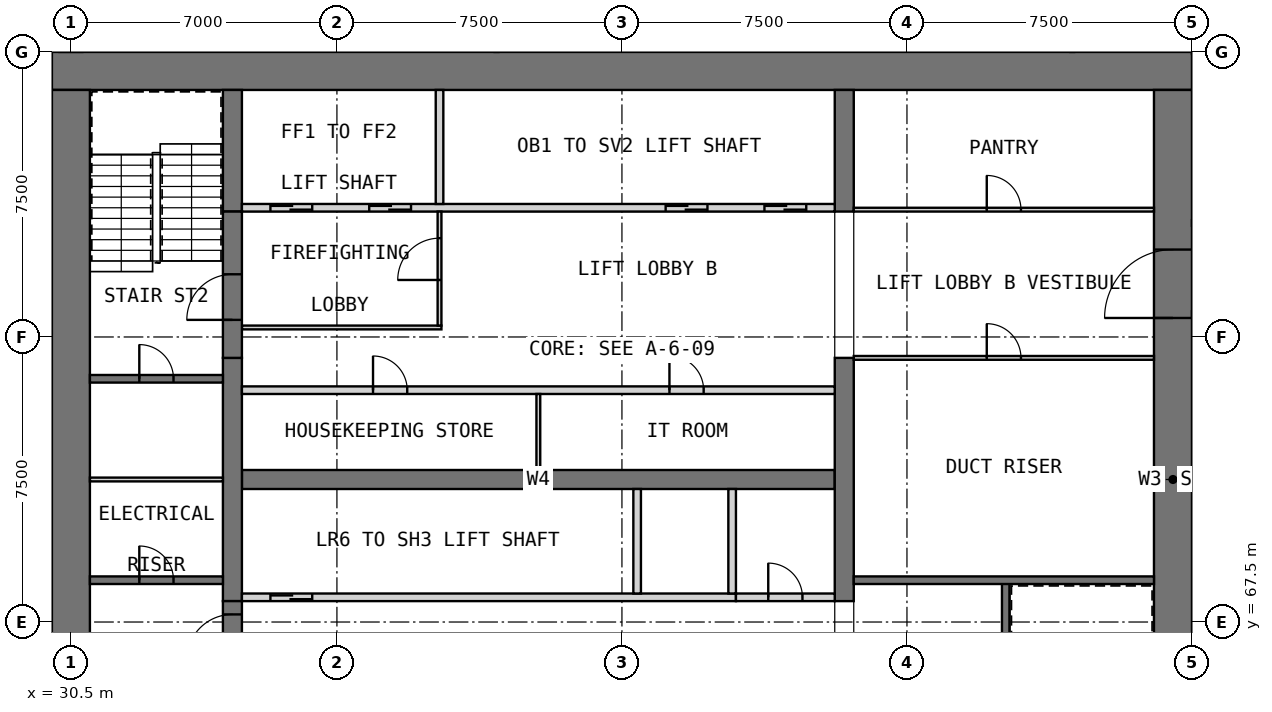
"""IFC4 building model, lengths in metres.
Left out: names, types, materials, properties, quantities, classifications, styles, units other than length and angle.
Written with IfcOpenShell. Run it as: python <this file> out.ifc"""

import sys

from ifc_helpers import new_model, si_unit, direction, frame, frame_2d, origin, place, context, subcontext, project, spatial, rectangle, extrude, element, fill, save


model = new_model("IFC4")
c1 = context("Model", 3, precision=1e-05, world=origin(), true_north=direction((0.0, 1.0)))
c2 = subcontext(c1, "Body", "Model", "MODEL_VIEW")
j1 = project(units=[si_unit("LENGTHUNIT", "METRE"), si_unit("PLANEANGLEUNIT", "RADIAN")], contexts=[c1])
p1 = place(None, origin())
s1 = spatial("IfcSite", under=j1, at=p1, CompositionType="ELEMENT")
p2 = place(p1, origin())
s2 = spatial("IfcBuilding", under=s1, at=p2, CompositionType="ELEMENT")
p3 = place(p2, frame((0.0, 0.0, 79.1)))
s3 = spatial("IfcBuildingStorey", under=s2, at=p3, CompositionType="ELEMENT", Elevation=79.1)
p4 = place(p3, frame((30.0, 82.0, 0.0), z_axis=(0.0, 0.0, 1.0), x_axis=(1.0, 0.0, 0.0)))
e1 = element("IfcWall", 1, at=p4, inside=s3, PredefinedType="SHEAR", context=c2, shape_type="SweptSolid", body=[
    extrude(rectangle(XDim=30.0, YDim=1.0, at=frame_2d((15.0, 0.0))), origin(), (0.0, 0.0, 1.0), 3.6),
])
p5 = place(p3, frame((30.5, 61.0, 0.0), z_axis=(0.0, 0.0, 1.0), x_axis=(0.0, 1.0, 0.0)))
e2 = element("IfcWall", 2, at=p5, inside=s3, PredefinedType="SHEAR", context=c2, shape_type="SweptSolid", body=[
    extrude(rectangle(XDim=20.5, YDim=1.0, at=frame_2d((10.25, 0.0))), origin(), (0.0, 0.0, 1.0), 3.6),
])
p6 = place(p3, frame((59.5, 61.0, 0.0), z_axis=(0.0, 0.0, 1.0), x_axis=(0.0, 1.0, 0.0)))
e3 = element("IfcWall", 3, at=p6, inside=s3, PredefinedType="SHEAR", context=c2, shape_type="SweptSolid", body=[
    extrude(rectangle(XDim=20.5, YDim=1.0, at=frame_2d((10.25, 0.0))), origin(), (0.0, 0.0, 1.0), 3.6),
])
p7 = place(p6, frame((14.5, 0.0, 0.0)))
e4 = element("IfcOpeningElement", 4, at=p7, cuts=e3, PredefinedType="OPENING", context=c2, shape_type="SweptSolid", body=[
    extrude(rectangle(XDim=1.8, YDim=2.1, at=frame_2d((0.9, 1.05))), frame((0.0, 0.51, 0.0), z_axis=(0.0, -1.0, 0.0), x_axis=(1.0, 0.0, 0.0)), (0.0, 0.0, 1.0), 1.02),
])
p8 = place(p3, frame((35.0, 71.25, 0.0), z_axis=(0.0, 0.0, 1.0), x_axis=(1.0, 0.0, 0.0)))
e5 = element("IfcWall", 5, at=p8, inside=s3, PredefinedType="SHEAR", context=c2, shape_type="SweptSolid", body=[
    extrude(rectangle(XDim=15.6, YDim=0.5, at=frame_2d((7.8, 0.0))), origin(), (0.0, 0.0, 1.0), 3.6),
])
p9 = place(p3, frame((34.75, 68.05, 0.0), z_axis=(0.0, 0.0, 1.0), x_axis=(0.0, 1.0, 0.0)))
e6 = element("IfcWall", 6, at=p9, inside=s3, PredefinedType="SHEAR", context=c2, shape_type="SweptSolid", body=[
    extrude(rectangle(XDim=6.4, YDim=0.5, at=frame_2d((3.2, 0.0))), origin(), (0.0, 0.0, 1.0), 3.6),
])
p10 = place(p3, frame((34.75, 78.3, 0.0), z_axis=(0.0, 0.0, 1.0), x_axis=(0.0, 1.0, 0.0)))
e7 = element("IfcWall", 7, at=p10, inside=s3, PredefinedType="SHEAR", context=c2, shape_type="SweptSolid", body=[
    extrude(rectangle(XDim=3.2, YDim=0.5, at=frame_2d((1.6, 0.0))), origin(), (0.0, 0.0, 1.0), 3.6),
])
p11 = place(p3, frame((50.85, 68.05, 0.0), z_axis=(0.0, 0.0, 1.0), x_axis=(0.0, 1.0, 0.0)))
e8 = element("IfcWall", 8, at=p11, inside=s3, PredefinedType="SHEAR", context=c2, shape_type="SweptSolid", body=[
    extrude(rectangle(XDim=6.4, YDim=0.5, at=frame_2d((3.2, 0.0))), origin(), (0.0, 0.0, 1.0), 3.6),
])
p12 = place(p3, frame((50.85, 78.3, 0.0), z_axis=(0.0, 0.0, 1.0), x_axis=(0.0, 1.0, 0.0)))
e9 = element("IfcWall", 9, at=p12, inside=s3, PredefinedType="SHEAR", context=c2, shape_type="SweptSolid", body=[
    extrude(rectangle(XDim=3.2, YDim=0.5, at=frame_2d((1.6, 0.0))), origin(), (0.0, 0.0, 1.0), 3.6),
])
p13 = place(p3, frame((35.0, 68.15, 0.0), z_axis=(0.0, 0.0, 1.0), x_axis=(1.0, 0.0, 0.0)))
e10 = element("IfcWall", 10, at=p13, inside=s3, PredefinedType="SOLIDWALL", context=c2, shape_type="SweptSolid", body=[
    extrude(rectangle(XDim=13.0, YDim=0.2, at=frame_2d((6.5, 0.0))), origin(), (0.0, 0.0, 1.0), 3.6),
])
p14 = place(p13, frame((0.75, 0.0, 0.0)))
e11 = element("IfcOpeningElement", 11, at=p14, cuts=e10, PredefinedType="OPENING", context=c2, shape_type="SweptSolid", body=[
    extrude(rectangle(XDim=1.1, YDim=2.1, at=frame_2d((0.55, 1.05))), frame((0.0, 0.11, 0.0), z_axis=(0.0, -1.0, 0.0), x_axis=(1.0, 0.0, 0.0)), (0.0, 0.0, 1.0), 0.22),
])
for number, where, z_axis, x_axis in (
    (12, (45.4, 68.25, 0.0), (0.0, 0.0, 1.0), (0.0, 1.0, 0.0)),
    (13, (47.9, 68.25, 0.0), (0.0, 0.0, 1.0), (0.0, 1.0, 0.0)),
):
    element("IfcWall", number, at=place(p3, frame(where, z_axis=z_axis, x_axis=x_axis)), inside=s3, PredefinedType="SOLIDWALL", context=c2, shape_type="SweptSolid", body=[
        extrude(rectangle(XDim=2.75, YDim=0.2, at=frame_2d((1.375, 0.0))), origin(), (0.0, 0.0, 1.0), 3.6),
    ])
p15 = place(p3, frame((48.0, 68.15, 0.0), z_axis=(0.0, 0.0, 1.0), x_axis=(1.0, 0.0, 0.0)))
e14 = element("IfcWall", 14, at=p15, inside=s3, PredefinedType="PARTITIONING", context=c2, shape_type="SweptSolid", body=[
    extrude(rectangle(XDim=2.6, YDim=0.2, at=frame_2d((1.3, 0.0))), origin(), (0.0, 0.0, 1.0), 3.35),
])
p16 = place(p15, frame((0.85, 0.0, 0.0)))
e15 = element("IfcOpeningElement", 15, at=p16, cuts=e14, PredefinedType="OPENING", context=c2, shape_type="SweptSolid", body=[
    extrude(rectangle(XDim=0.9, YDim=2.1, at=frame_2d((0.45, 1.05))), frame((0.0, 0.11, 0.0), z_axis=(0.0, -1.0, 0.0), x_axis=(1.0, 0.0, 0.0)), (0.0, 0.0, 1.0), 0.22),
])
p17 = place(p3, frame((35.0, 73.6, 0.0), z_axis=(0.0, 0.0, 1.0), x_axis=(1.0, 0.0, 0.0)))
e16 = element("IfcWall", 16, at=p17, inside=s3, PredefinedType="PARTITIONING", context=c2, shape_type="SweptSolid", body=[
    extrude(rectangle(XDim=15.6, YDim=0.2, at=frame_2d((7.8, 0.0))), origin(), (0.0, 0.0, 1.0), 3.35),
])
p18 = place(p17, frame((3.45, 0.0, 0.0)))
e17 = element("IfcOpeningElement", 17, at=p18, cuts=e16, PredefinedType="OPENING", context=c2, shape_type="SweptSolid", body=[
    extrude(rectangle(XDim=0.9, YDim=2.1, at=frame_2d((0.45, 1.05))), frame((0.0, 0.11, 0.0), z_axis=(0.0, -1.0, 0.0), x_axis=(1.0, 0.0, 0.0)), (0.0, 0.0, 1.0), 0.22),
])
p19 = place(p17, frame((11.25, 0.0, 0.0)))
e18 = element("IfcOpeningElement", 18, at=p19, cuts=e16, PredefinedType="OPENING", context=c2, shape_type="SweptSolid", body=[
    extrude(rectangle(XDim=0.9, YDim=2.1, at=frame_2d((0.45, 1.05))), frame((0.0, 0.11, 0.0), z_axis=(0.0, -1.0, 0.0), x_axis=(1.0, 0.0, 0.0)), (0.0, 0.0, 1.0), 0.22),
])
p20 = place(p3, frame((42.8, 71.5, 0.0), z_axis=(0.0, 0.0, 1.0), x_axis=(0.0, 1.0, 0.0)))
e19 = element("IfcWall", 19, at=p20, inside=s3, PredefinedType="PARTITIONING", context=c2, shape_type="SweptSolid", body=[
    extrude(rectangle(XDim=2.0, YDim=0.1, at=frame_2d((1.0, 0.0))), origin(), (0.0, 0.0, 1.0), 3.35),
])
p21 = place(p3, frame((35.0, 78.4, 0.0), z_axis=(0.0, 0.0, 1.0), x_axis=(1.0, 0.0, 0.0)))
e20 = element("IfcWall", 20, at=p21, inside=s3, PredefinedType="SOLIDWALL", context=c2, shape_type="SweptSolid", body=[
    extrude(rectangle(XDim=15.6, YDim=0.2, at=frame_2d((7.8, 0.0))), origin(), (0.0, 0.0, 1.0), 3.6),
])
p22 = place(p21, frame((0.75, 0.0, 0.0)))
e21 = element("IfcOpeningElement", 21, at=p22, cuts=e20, PredefinedType="OPENING", context=c2, shape_type="SweptSolid", body=[
    extrude(rectangle(XDim=1.1, YDim=2.1, at=frame_2d((0.55, 1.05))), frame((0.0, 0.11, 0.0), z_axis=(0.0, -1.0, 0.0), x_axis=(1.0, 0.0, 0.0)), (0.0, 0.0, 1.0), 0.22),
])
p23 = place(p21, frame((3.35, 0.0, 0.0)))
e22 = element("IfcOpeningElement", 22, at=p23, cuts=e20, PredefinedType="OPENING", context=c2, shape_type="SweptSolid", body=[
    extrude(rectangle(XDim=1.1, YDim=2.1, at=frame_2d((0.55, 1.05))), frame((0.0, 0.11, 0.0), z_axis=(0.0, -1.0, 0.0), x_axis=(1.0, 0.0, 0.0)), (0.0, 0.0, 1.0), 0.22),
])
p24 = place(p21, frame((11.15, 0.0, 0.0)))
e23 = element("IfcOpeningElement", 23, at=p24, cuts=e20, PredefinedType="OPENING", context=c2, shape_type="SweptSolid", body=[
    extrude(rectangle(XDim=1.1, YDim=2.1, at=frame_2d((0.55, 1.05))), frame((0.0, 0.11, 0.0), z_axis=(0.0, -1.0, 0.0), x_axis=(1.0, 0.0, 0.0)), (0.0, 0.0, 1.0), 0.22),
])
p25 = place(p21, frame((13.75, 0.0, 0.0)))
e24 = element("IfcOpeningElement", 24, at=p25, cuts=e20, PredefinedType="OPENING", context=c2, shape_type="SweptSolid", body=[
    extrude(rectangle(XDim=1.1, YDim=2.1, at=frame_2d((0.55, 1.05))), frame((0.0, 0.11, 0.0), z_axis=(0.0, -1.0, 0.0), x_axis=(1.0, 0.0, 0.0)), (0.0, 0.0, 1.0), 0.22),
])
p26 = place(p3, frame((40.2, 78.5, 0.0), z_axis=(0.0, 0.0, 1.0), x_axis=(0.0, 1.0, 0.0)))
e25 = element("IfcWall", 25, at=p26, inside=s3, PredefinedType="SOLIDWALL", context=c2, shape_type="SweptSolid", body=[
    extrude(rectangle(XDim=3.0, YDim=0.2, at=frame_2d((1.5, 0.0))), origin(), (0.0, 0.0, 1.0), 3.6),
])
p27 = place(p3, frame((35.0, 75.25, 0.0), z_axis=(0.0, 0.0, 1.0), x_axis=(1.0, 0.0, 0.0)))
e26 = element("IfcWall", 26, at=p27, inside=s3, PredefinedType="PARTITIONING", context=c2, shape_type="SweptSolid", body=[
    extrude(rectangle(XDim=5.25, YDim=0.1, at=frame_2d((2.625, 0.0))), origin(), (0.0, 0.0, 1.0), 3.35),
])
p28 = place(p3, frame((40.2, 75.3, 0.0), z_axis=(0.0, 0.0, 1.0), x_axis=(0.0, 1.0, 0.0)))
e27 = element("IfcWall", 27, at=p28, inside=s3, PredefinedType="PARTITIONING", context=c2, shape_type="SweptSolid", body=[
    extrude(rectangle(XDim=3.0, YDim=0.1, at=frame_2d((1.5, 0.0))), origin(), (0.0, 0.0, 1.0), 3.35),
])
p29 = place(p28, frame((1.2, 0.0, 0.0)))
e28 = element("IfcOpeningElement", 28, at=p29, cuts=e27, PredefinedType="OPENING", context=c2, shape_type="SweptSolid", body=[
    extrude(rectangle(XDim=1.1, YDim=2.1, at=frame_2d((0.55, 1.05))), frame((0.0, 0.06, 0.0), z_axis=(0.0, -1.0, 0.0), x_axis=(1.0, 0.0, 0.0)), (0.0, 0.0, 1.0), 0.12),
])
p30 = place(p3, frame((34.75, 64.2, 0.0), z_axis=(0.0, 0.0, 1.0), x_axis=(0.0, 1.0, 0.0)))
e29 = element("IfcWall", 29, at=p30, inside=s3, PredefinedType="SOLIDWALL", context=c2, shape_type="SweptSolid", body=[
    extrude(rectangle(XDim=3.85, YDim=0.5, at=frame_2d((1.925, 0.0))), origin(), (0.0, 0.0, 1.0), 2.4),
])
p31 = place(p30, frame((2.3, 0.0, 0.0)))
e30 = element("IfcOpeningElement", 30, at=p31, cuts=e29, PredefinedType="OPENING", context=c2, shape_type="SweptSolid", body=[
    extrude(rectangle(XDim=1.2, YDim=2.1, at=frame_2d((0.6, 1.05))), frame((0.0, 0.26, 0.0), z_axis=(0.0, -1.0, 0.0), x_axis=(1.0, 0.0, 0.0)), (0.0, 0.0, 1.0), 0.52),
])
p32 = place(p3, frame((34.75, 74.45, 0.0), z_axis=(0.0, 0.0, 1.0), x_axis=(0.0, 1.0, 0.0)))
e31 = element("IfcWall", 31, at=p32, inside=s3, PredefinedType="SOLIDWALL", context=c2, shape_type="SweptSolid", body=[
    extrude(rectangle(XDim=3.85, YDim=0.5, at=frame_2d((1.925, 0.0))), origin(), (0.0, 0.0, 1.0), 2.4),
])
p33 = place(p32, frame((1.0, 0.0, 0.0)))
e32 = element("IfcOpeningElement", 32, at=p33, cuts=e31, PredefinedType="OPENING", context=c2, shape_type="SweptSolid", body=[
    extrude(rectangle(XDim=1.2, YDim=2.1, at=frame_2d((0.6, 1.05))), frame((0.0, 0.26, 0.0), z_axis=(0.0, -1.0, 0.0), x_axis=(1.0, 0.0, 0.0)), (0.0, 0.0, 1.0), 0.52),
])
p34 = place(p3, frame((31.0, 68.6, 0.0), z_axis=(0.0, 0.0, 1.0), x_axis=(1.0, 0.0, 0.0)))
e33 = element("IfcWall", 33, at=p34, inside=s3, PredefinedType="SOLIDWALL", context=c2, shape_type="SweptSolid", body=[
    extrude(rectangle(XDim=3.5, YDim=0.2, at=frame_2d((1.75, 0.0))), origin(), (0.0, 0.0, 1.0), 3.35),
])
p35 = place(p34, frame((1.3, 0.0, 0.0)))
e34 = element("IfcOpeningElement", 34, at=p35, cuts=e33, PredefinedType="OPENING", context=c2, shape_type="SweptSolid", body=[
    extrude(rectangle(XDim=0.9, YDim=2.1, at=frame_2d((0.45, 1.05))), frame((0.0, 0.11, 0.0), z_axis=(0.0, -1.0, 0.0), x_axis=(1.0, 0.0, 0.0)), (0.0, 0.0, 1.0), 0.22),
])
p36 = place(p3, frame((31.0, 73.9, 0.0), z_axis=(0.0, 0.0, 1.0), x_axis=(1.0, 0.0, 0.0)))
e35 = element("IfcWall", 35, at=p36, inside=s3, PredefinedType="SOLIDWALL", context=c2, shape_type="SweptSolid", body=[
    extrude(rectangle(XDim=3.5, YDim=0.2, at=frame_2d((1.75, 0.0))), origin(), (0.0, 0.0, 1.0), 3.35),
])
p37 = place(p36, frame((1.3, 0.0, 0.0)))
e36 = element("IfcOpeningElement", 36, at=p37, cuts=e35, PredefinedType="OPENING", context=c2, shape_type="SweptSolid", body=[
    extrude(rectangle(XDim=0.9, YDim=2.1, at=frame_2d((0.45, 1.05))), frame((0.0, 0.11, 0.0), z_axis=(0.0, -1.0, 0.0), x_axis=(1.0, 0.0, 0.0)), (0.0, 0.0, 1.0), 0.22),
])
p38 = place(p3, frame((55.1, 61.0, 0.0), z_axis=(0.0, 0.0, 1.0), x_axis=(0.0, 1.0, 0.0)))
e37 = element("IfcWall", 37, at=p38, inside=s3, PredefinedType="SOLIDWALL", context=c2, shape_type="SweptSolid", body=[
    extrude(rectangle(XDim=7.6, YDim=0.2, at=frame_2d((3.8, 0.0))), origin(), (0.0, 0.0, 1.0), 3.35),
])
p39 = place(p3, frame((51.1, 68.6, 0.0), z_axis=(0.0, 0.0, 1.0), x_axis=(1.0, 0.0, 0.0)))
e38 = element("IfcWall", 38, at=p39, inside=s3, PredefinedType="SOLIDWALL", context=c2, shape_type="SweptSolid", body=[
    extrude(rectangle(XDim=7.9, YDim=0.2, at=frame_2d((3.95, 0.0))), origin(), (0.0, 0.0, 1.0), 3.35),
])
p40 = place(p3, frame((31.0, 71.25, 0.0), z_axis=(0.0, 0.0, 1.0), x_axis=(1.0, 0.0, 0.0)))
e39 = element("IfcWall", 39, at=p40, inside=s3, PredefinedType="PARTITIONING", context=c2, shape_type="SweptSolid", body=[
    extrude(rectangle(XDim=3.5, YDim=0.1, at=frame_2d((1.75, 0.0))), origin(), (0.0, 0.0, 1.0), 3.35),
])
p41 = place(p3, frame((51.1, 74.45, 0.0), z_axis=(0.0, 0.0, 1.0), x_axis=(1.0, 0.0, 0.0)))
e40 = element("IfcWall", 40, at=p41, inside=s3, PredefinedType="PARTITIONING", context=c2, shape_type="SweptSolid", body=[
    extrude(rectangle(XDim=7.9, YDim=0.1, at=frame_2d((3.95, 0.0))), origin(), (0.0, 0.0, 1.0), 3.35),
])
p42 = place(p41, frame((3.5, 0.0, 0.0)))
e41 = element("IfcOpeningElement", 41, at=p42, cuts=e40, PredefinedType="OPENING", context=c2, shape_type="SweptSolid", body=[
    extrude(rectangle(XDim=0.9, YDim=2.1, at=frame_2d((0.45, 1.05))), frame((0.0, 0.06, 0.0), z_axis=(0.0, -1.0, 0.0), x_axis=(1.0, 0.0, 0.0)), (0.0, 0.0, 1.0), 0.12),
])
p43 = place(p3, frame((51.1, 78.35, 0.0), z_axis=(0.0, 0.0, 1.0), x_axis=(1.0, 0.0, 0.0)))
e42 = element("IfcWall", 42, at=p43, inside=s3, PredefinedType="PARTITIONING", context=c2, shape_type="SweptSolid", body=[
    extrude(rectangle(XDim=7.9, YDim=0.1, at=frame_2d((3.95, 0.0))), origin(), (0.0, 0.0, 1.0), 3.35),
])
p44 = place(p43, frame((3.5, 0.0, 0.0)))
e43 = element("IfcOpeningElement", 43, at=p44, cuts=e42, PredefinedType="OPENING", context=c2, shape_type="SweptSolid", body=[
    extrude(rectangle(XDim=0.9, YDim=2.1, at=frame_2d((0.45, 1.05))), frame((0.0, 0.06, 0.0), z_axis=(0.0, -1.0, 0.0), x_axis=(1.0, 0.0, 0.0)), (0.0, 0.0, 1.0), 0.12),
])
p45 = place(p3, frame((60.0, 82.5, 0.0), z_axis=(0.0, 0.0, 1.0), x_axis=(1.0, 0.0, 0.0)))
e44 = element("IfcWall", 44, at=p45, inside=s3, PredefinedType="PARTITIONING", context=c2, shape_type="SweptSolid", body=[
    extrude(rectangle(XDim=14.925, YDim=0.1, at=frame_2d((7.462, 0.0))), origin(), (0.0, 0.0, 1.0), 3.35),
])
for number, where, z_axis, x_axis in (
    (45, (41.7, 82.5, 0.0), (0.0, 0.0, 1.0), (0.0, 1.0, 0.0)),
    (46, (56.85, 82.5, 0.0), (0.0, 0.0, 1.0), (0.0, 1.0, 0.0)),
):
    element("IfcWall", number, at=place(p3, frame(where, z_axis=z_axis, x_axis=x_axis)), inside=s3, PredefinedType="PARTITIONING", context=c2, shape_type="SweptSolid", body=[
        extrude(rectangle(XDim=7.425, YDim=0.1, at=frame_2d((3.712, 0.0))), origin(), (0.0, 0.0, 1.0), 3.35),
    ])
p46 = place(p14, origin())
e47 = element("IfcDoor", 47, at=p46, inside=s3, OperationType="DOUBLE_DOOR_SLIDING", PredefinedType="DOOR", context=c2, shape_type="SweptSolid", body=[
    extrude(rectangle(XDim=1.1, YDim=2.1, at=frame_2d((0.55, 1.05))), frame((0.0, 0.025, 0.0), z_axis=(0.0, -1.0, 0.0), x_axis=(1.0, 0.0, 0.0)), (0.0, 0.0, 1.0), 0.05),
])
fill(e11, e47)
p47 = place(p16, origin())
e48 = element("IfcDoor", 48, at=p47, inside=s3, OperationType="SINGLE_SWING_RIGHT", PredefinedType="DOOR", context=c2, shape_type="SweptSolid", body=[
    extrude(rectangle(XDim=0.9, YDim=2.1, at=frame_2d((0.45, 1.05))), frame((0.0, 0.025, 0.0), z_axis=(0.0, -1.0, 0.0), x_axis=(1.0, 0.0, 0.0)), (0.0, 0.0, 1.0), 0.05),
])
fill(e15, e48)
p48 = place(p18, origin())
e49 = element("IfcDoor", 49, at=p48, inside=s3, OperationType="SINGLE_SWING_RIGHT", PredefinedType="DOOR", context=c2, shape_type="SweptSolid", body=[
    extrude(rectangle(XDim=0.9, YDim=2.1, at=frame_2d((0.45, 1.05))), frame((0.0, 0.025, 0.0), z_axis=(0.0, -1.0, 0.0), x_axis=(1.0, 0.0, 0.0)), (0.0, 0.0, 1.0), 0.05),
])
fill(e17, e49)
p49 = place(p19, origin())
e50 = element("IfcDoor", 50, at=p49, inside=s3, OperationType="SINGLE_SWING_LEFT", PredefinedType="DOOR", context=c2, shape_type="SweptSolid", body=[
    extrude(rectangle(XDim=0.9, YDim=2.1, at=frame_2d((0.45, 1.05))), frame((0.0, 0.025, 0.0), z_axis=(0.0, -1.0, 0.0), x_axis=(1.0, 0.0, 0.0)), (0.0, 0.0, 1.0), 0.05),
])
fill(e18, e50)
p50 = place(p22, origin())
e51 = element("IfcDoor", 51, at=p50, inside=s3, OperationType="DOUBLE_DOOR_SLIDING", PredefinedType="DOOR", context=c2, shape_type="SweptSolid", body=[
    extrude(rectangle(XDim=1.1, YDim=2.1, at=frame_2d((0.55, 1.05))), frame((0.0, 0.025, 0.0), z_axis=(0.0, -1.0, 0.0), x_axis=(1.0, 0.0, 0.0)), (0.0, 0.0, 1.0), 0.05),
])
fill(e21, e51)
p51 = place(p23, origin())
e52 = element("IfcDoor", 52, at=p51, inside=s3, OperationType="DOUBLE_DOOR_SLIDING", PredefinedType="DOOR", context=c2, shape_type="SweptSolid", body=[
    extrude(rectangle(XDim=1.1, YDim=2.1, at=frame_2d((0.55, 1.05))), frame((0.0, 0.025, 0.0), z_axis=(0.0, -1.0, 0.0), x_axis=(1.0, 0.0, 0.0)), (0.0, 0.0, 1.0), 0.05),
])
fill(e22, e52)
p52 = place(p24, origin())
e53 = element("IfcDoor", 53, at=p52, inside=s3, OperationType="DOUBLE_DOOR_SLIDING", PredefinedType="DOOR", context=c2, shape_type="SweptSolid", body=[
    extrude(rectangle(XDim=1.1, YDim=2.1, at=frame_2d((0.55, 1.05))), frame((0.0, 0.025, 0.0), z_axis=(0.0, -1.0, 0.0), x_axis=(1.0, 0.0, 0.0)), (0.0, 0.0, 1.0), 0.05),
])
fill(e23, e53)
p53 = place(p25, origin())
e54 = element("IfcDoor", 54, at=p53, inside=s3, OperationType="DOUBLE_DOOR_SLIDING", PredefinedType="DOOR", context=c2, shape_type="SweptSolid", body=[
    extrude(rectangle(XDim=1.1, YDim=2.1, at=frame_2d((0.55, 1.05))), frame((0.0, 0.025, 0.0), z_axis=(0.0, -1.0, 0.0), x_axis=(1.0, 0.0, 0.0)), (0.0, 0.0, 1.0), 0.05),
])
fill(e24, e54)
p54 = place(p7, origin())
e55 = element("IfcDoor", 55, at=p54, inside=s3, OperationType="DOUBLE_DOOR_SINGLE_SWING", PredefinedType="DOOR", context=c2, shape_type="SweptSolid", body=[
    extrude(rectangle(XDim=1.8, YDim=2.1, at=frame_2d((0.9, 1.05))), frame((0.0, 0.025, 0.0), z_axis=(0.0, -1.0, 0.0), x_axis=(1.0, 0.0, 0.0)), (0.0, 0.0, 1.0), 0.05),
])
fill(e4, e55)
p55 = place(p29, origin())
e56 = element("IfcDoor", 56, at=p55, inside=s3, OperationType="SINGLE_SWING_LEFT", PredefinedType="DOOR", context=c2, shape_type="SweptSolid", body=[
    extrude(rectangle(XDim=1.1, YDim=2.1, at=frame_2d((0.55, 1.05))), frame((0.0, 0.025, 0.0), z_axis=(0.0, -1.0, 0.0), x_axis=(1.0, 0.0, 0.0)), (0.0, 0.0, 1.0), 0.05),
])
fill(e28, e56)
p56 = place(p31, origin())
e57 = element("IfcDoor", 57, at=p56, inside=s3, OperationType="SINGLE_SWING_LEFT", PredefinedType="DOOR", context=c2, shape_type="SweptSolid", body=[
    extrude(rectangle(XDim=1.2, YDim=2.1, at=frame_2d((0.6, 1.05))), frame((0.0, 0.025, 0.0), z_axis=(0.0, -1.0, 0.0), x_axis=(1.0, 0.0, 0.0)), (0.0, 0.0, 1.0), 0.05),
])
fill(e30, e57)
p57 = place(p33, origin())
e58 = element("IfcDoor", 58, at=p57, inside=s3, OperationType="SINGLE_SWING_RIGHT", PredefinedType="DOOR", context=c2, shape_type="SweptSolid", body=[
    extrude(rectangle(XDim=1.2, YDim=2.1, at=frame_2d((0.6, 1.05))), frame((0.0, 0.025, 0.0), z_axis=(0.0, -1.0, 0.0), x_axis=(1.0, 0.0, 0.0)), (0.0, 0.0, 1.0), 0.05),
])
fill(e32, e58)
p58 = place(p35, origin())
e59 = element("IfcDoor", 59, at=p58, inside=s3, OperationType="SINGLE_SWING_LEFT", PredefinedType="DOOR", context=c2, shape_type="SweptSolid", body=[
    extrude(rectangle(XDim=0.9, YDim=2.1, at=frame_2d((0.45, 1.05))), frame((0.0, 0.025, 0.0), z_axis=(0.0, -1.0, 0.0), x_axis=(1.0, 0.0, 0.0)), (0.0, 0.0, 1.0), 0.05),
])
fill(e34, e59)
p59 = place(p37, origin())
e60 = element("IfcDoor", 60, at=p59, inside=s3, OperationType="SINGLE_SWING_RIGHT", PredefinedType="DOOR", context=c2, shape_type="SweptSolid", body=[
    extrude(rectangle(XDim=0.9, YDim=2.1, at=frame_2d((0.45, 1.05))), frame((0.0, 0.025, 0.0), z_axis=(0.0, -1.0, 0.0), x_axis=(1.0, 0.0, 0.0)), (0.0, 0.0, 1.0), 0.05),
])
fill(e36, e60)
p60 = place(p42, origin())
e61 = element("IfcDoor", 61, at=p60, inside=s3, OperationType="SINGLE_SWING_RIGHT", PredefinedType="DOOR", context=c2, shape_type="SweptSolid", body=[
    extrude(rectangle(XDim=0.9, YDim=2.1, at=frame_2d((0.45, 1.05))), frame((0.0, 0.025, 0.0), z_axis=(0.0, -1.0, 0.0), x_axis=(1.0, 0.0, 0.0)), (0.0, 0.0, 1.0), 0.05),
])
fill(e41, e61)
p61 = place(p44, origin())
e62 = element("IfcDoor", 62, at=p61, inside=s3, OperationType="SINGLE_SWING_RIGHT", PredefinedType="DOOR", context=c2, shape_type="SweptSolid", body=[
    extrude(rectangle(XDim=0.9, YDim=2.1, at=frame_2d((0.45, 1.05))), frame((0.0, 0.025, 0.0), z_axis=(0.0, -1.0, 0.0), x_axis=(1.0, 0.0, 0.0)), (0.0, 0.0, 1.0), 0.05),
])
fill(e43, e62)
save(model, sys.argv[1])
